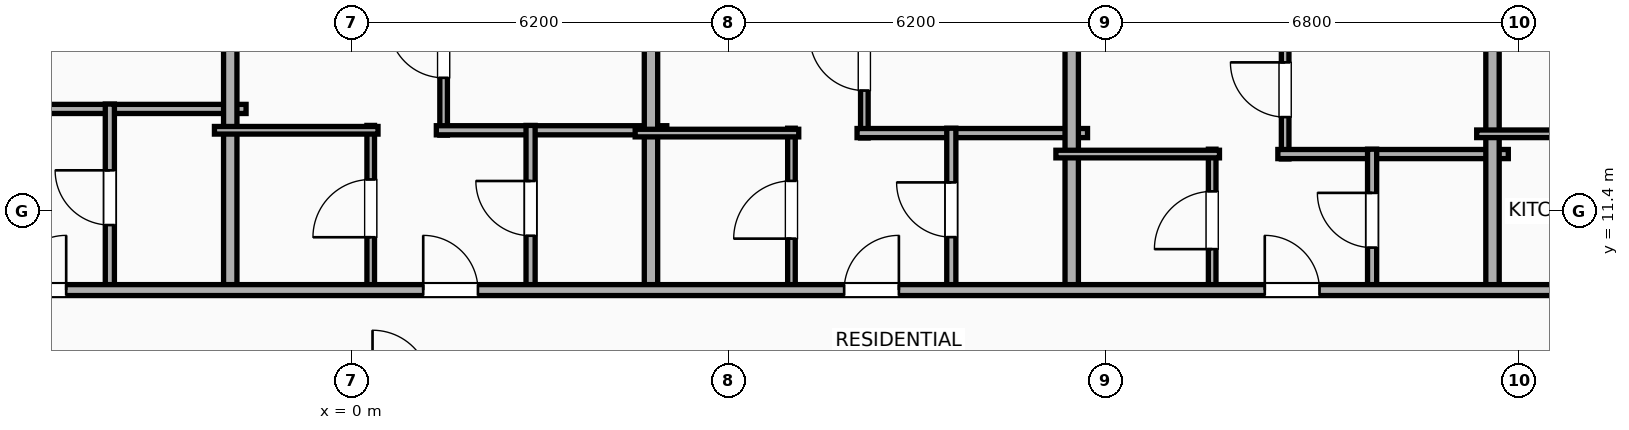
"""IFC4 building model, lengths in metres.
Left out: names, types, materials, properties, quantities, classifications, styles, units other than length and angle.
Written with IfcOpenShell. Run it as: python <this file> out.ifc"""

import sys

from ifc_helpers import new_model, si_unit, direction, frame, frame_2d, origin, place, context, subcontext, project, spatial, rectangle, extrude, element, fill, save


model = new_model("IFC4")
c1 = context("Model", 3, precision=1e-05, world=origin(), true_north=direction((0.0, 1.0)))
c2 = subcontext(c1, "Body", "Model", "MODEL_VIEW")
j1 = project(units=[si_unit("LENGTHUNIT", "METRE"), si_unit("PLANEANGLEUNIT", "RADIAN")], contexts=[c1])
p1 = place(None, origin())
s1 = spatial("IfcSite", under=j1, at=p1, CompositionType="ELEMENT")
p2 = place(p1, origin())
s2 = spatial("IfcBuilding", under=s1, at=p2, CompositionType="ELEMENT")
p3 = place(p2, frame((0.0, 0.0, 299.0)))
s3 = spatial("IfcBuildingStorey", under=s2, at=p3, CompositionType="ELEMENT", Elevation=299.0)
p4 = place(p3, frame((-5.53, 13.079, 0.0), z_axis=(0.0, 0.0, 1.0), x_axis=(1.0, 0.0, 0.0)))
e1 = element("IfcWall", 1, at=p4, inside=s3, PredefinedType="PLUMBINGWALL", context=c2, shape_type="SweptSolid", body=[
    extrude(rectangle(XDim=3.79, YDim=0.15, at=frame_2d((1.895, 0.0))), origin(), (0.0, 0.0, 1.0), 3.635),
])
p5 = place(p3, frame((-3.98, 10.08, 0.0), z_axis=(0.0, 0.0, 1.0), x_axis=(0.0, 1.0, 0.0)))
e2 = element("IfcWall", 2, at=p5, inside=s3, PredefinedType="PLUMBINGWALL", context=c2, shape_type="SweptSolid", body=[
    extrude(rectangle(XDim=3.079, YDim=0.15, at=frame_2d((1.54, 0.0))), origin(), (0.0, 0.0, 1.0), 3.635),
])
p6 = place(p5, frame((1.09, 0.0, 0.0)))
e3 = element("IfcOpeningElement", 3, at=p6, cuts=e2, PredefinedType="OPENING", context=c2, shape_type="SweptSolid", body=[
    extrude(rectangle(XDim=0.9, YDim=2.05, at=frame_2d((0.45, 1.025))), frame((0.0, 0.085, 0.0), z_axis=(0.0, -1.0, 0.0), x_axis=(1.0, 0.0, 0.0)), (0.0, 0.0, 1.0), 0.17),
])
p7 = place(p3, frame((-2.0, 10.02, 0.0), z_axis=(0.0, 0.0, 1.0), x_axis=(0.0, 1.0, 0.0)))
e4 = element("IfcWall", 4, at=p7, inside=s3, PredefinedType="PARTITIONING", context=c2, shape_type="SweptSolid", body=[
    extrude(rectangle(XDim=8.65, YDim=0.22, at=frame_2d((4.325, 0.0))), origin(), (0.0, 0.0, 1.0), 3.635),
])
p8 = place(p3, frame((1.509, 12.648, 0.0), z_axis=(0.0, 0.0, 1.0), x_axis=(0.0, 1.0, 0.0)))
e5 = element("IfcWall", 5, at=p8, inside=s3, PredefinedType="PARTITIONING", context=c2, shape_type="SweptSolid", body=[
    extrude(rectangle(XDim=5.804, YDim=0.125, at=frame_2d((2.902, 0.0))), origin(), (0.0, 0.0, 1.0), 3.635),
])
p9 = place(p8, frame((0.943, 0.0, 0.0)))
e6 = element("IfcOpeningElement", 6, at=p9, cuts=e5, PredefinedType="OPENING", context=c2, shape_type="SweptSolid", body=[
    extrude(rectangle(XDim=0.9, YDim=2.05, at=frame_2d((0.45, 1.025))), frame((0.0, 0.073, 0.0), z_axis=(0.0, -1.0, 0.0), x_axis=(1.0, 0.0, 0.0)), (0.0, 0.0, 1.0), 0.145),
])
p10 = place(p3, frame((1.389, 12.728, 0.0), z_axis=(0.0, 0.0, 1.0), x_axis=(1.0, 0.0, 0.0)))
e7 = element("IfcWall", 7, at=p10, inside=s3, PredefinedType="PLUMBINGWALL", context=c2, shape_type="SweptSolid", body=[
    extrude(rectangle(XDim=3.79, YDim=0.15, at=frame_2d((1.895, 0.0))), origin(), (0.0, 0.0, 1.0), 3.635),
])
p11 = place(p3, frame((0.31, 10.08, 0.0), z_axis=(0.0, 0.0, 1.0), x_axis=(0.0, 1.0, 0.0)))
e8 = element("IfcWall", 8, at=p11, inside=s3, PredefinedType="PARTITIONING", context=c2, shape_type="SweptSolid", body=[
    extrude(rectangle(XDim=2.728, YDim=0.125, at=frame_2d((1.364, 0.0))), origin(), (0.0, 0.0, 1.0), 3.635),
])
p12 = place(p11, frame((0.889, 0.0, 0.0)))
e9 = element("IfcOpeningElement", 9, at=p12, cuts=e8, PredefinedType="OPENING", context=c2, shape_type="SweptSolid", body=[
    extrude(rectangle(XDim=0.95, YDim=2.05, at=frame_2d((0.475, 1.025))), frame((0.0, 0.073, 0.0), z_axis=(0.0, -1.0, 0.0), x_axis=(1.0, 0.0, 0.0)), (0.0, 0.0, 1.0), 0.145),
])
p13 = place(p3, frame((-2.26, 12.728, 0.0), z_axis=(0.0, 0.0, 1.0), x_axis=(1.0, 0.0, 0.0)))
e10 = element("IfcWall", 10, at=p13, inside=s3, PredefinedType="PARTITIONING", context=c2, shape_type="SweptSolid", body=[
    extrude(rectangle(XDim=2.69, YDim=0.125, at=frame_2d((1.345, 0.0))), origin(), (0.0, 0.0, 1.0), 3.635),
])
p14 = place(p3, frame((2.939, 10.08, 0.0), z_axis=(0.0, 0.0, 1.0), x_axis=(0.0, 1.0, 0.0)))
e11 = element("IfcWall", 11, at=p14, inside=s3, PredefinedType="PLUMBINGWALL", context=c2, shape_type="SweptSolid", body=[
    extrude(rectangle(XDim=2.728, YDim=0.15, at=frame_2d((1.364, 0.0))), origin(), (0.0, 0.0, 1.0), 3.635),
])
p15 = place(p14, frame((0.914, 0.0, 0.0)))
e12 = element("IfcOpeningElement", 12, at=p15, cuts=e11, PredefinedType="OPENING", context=c2, shape_type="SweptSolid", body=[
    extrude(rectangle(XDim=0.9, YDim=2.05, at=frame_2d((0.45, 1.025))), frame((0.0, 0.085, 0.0), z_axis=(0.0, -1.0, 0.0), x_axis=(1.0, 0.0, 0.0)), (0.0, 0.0, 1.0), 0.17),
])
p16 = place(p3, frame((4.919, 10.02, 0.0), z_axis=(0.0, 0.0, 1.0), x_axis=(0.0, 1.0, 0.0)))
e13 = element("IfcWall", 13, at=p16, inside=s3, PredefinedType="PARTITIONING", context=c2, shape_type="SweptSolid", body=[
    extrude(rectangle(XDim=7.922, YDim=0.22, at=frame_2d((3.961, 0.0))), origin(), (0.0, 0.0, 1.0), 3.635),
])
p17 = place(p3, frame((8.428, 12.602, 0.0), z_axis=(0.0, 0.0, 1.0), x_axis=(0.0, 1.0, 0.0)))
e14 = element("IfcWall", 14, at=p17, inside=s3, PredefinedType="PARTITIONING", context=c2, shape_type="SweptSolid", body=[
    extrude(rectangle(XDim=5.122, YDim=0.125, at=frame_2d((2.561, 0.0))), origin(), (0.0, 0.0, 1.0), 3.635),
])
p18 = place(p17, frame((0.779, 0.0, 0.0)))
e15 = element("IfcOpeningElement", 15, at=p18, cuts=e14, PredefinedType="OPENING", context=c2, shape_type="SweptSolid", body=[
    extrude(rectangle(XDim=0.9, YDim=2.05, at=frame_2d((0.45, 1.025))), frame((0.0, 0.073, 0.0), z_axis=(0.0, -1.0, 0.0), x_axis=(1.0, 0.0, 0.0)), (0.0, 0.0, 1.0), 0.145),
])
p19 = place(p3, frame((8.308, 12.682, 0.0), z_axis=(0.0, 0.0, 1.0), x_axis=(1.0, 0.0, 0.0)))
e16 = element("IfcWall", 16, at=p19, inside=s3, PredefinedType="PLUMBINGWALL", context=c2, shape_type="SweptSolid", body=[
    extrude(rectangle(XDim=3.79, YDim=0.15, at=frame_2d((1.895, 0.0))), origin(), (0.0, 0.0, 1.0), 3.635),
])
p20 = place(p3, frame((7.229, 10.08, 0.0), z_axis=(0.0, 0.0, 1.0), x_axis=(0.0, 1.0, 0.0)))
e17 = element("IfcWall", 17, at=p20, inside=s3, PredefinedType="PARTITIONING", context=c2, shape_type="SweptSolid", body=[
    extrude(rectangle(XDim=2.682, YDim=0.125, at=frame_2d((1.341, 0.0))), origin(), (0.0, 0.0, 1.0), 3.635),
])
p21 = place(p20, frame((0.866, 0.0, 0.0)))
e18 = element("IfcOpeningElement", 18, at=p21, cuts=e17, PredefinedType="OPENING", context=c2, shape_type="SweptSolid", body=[
    extrude(rectangle(XDim=0.95, YDim=2.05, at=frame_2d((0.475, 1.025))), frame((0.0, 0.073, 0.0), z_axis=(0.0, -1.0, 0.0), x_axis=(1.0, 0.0, 0.0)), (0.0, 0.0, 1.0), 0.145),
])
p22 = place(p3, frame((4.659, 12.682, 0.0), z_axis=(0.0, 0.0, 1.0), x_axis=(1.0, 0.0, 0.0)))
e19 = element("IfcWall", 19, at=p22, inside=s3, PredefinedType="PARTITIONING", context=c2, shape_type="SweptSolid", body=[
    extrude(rectangle(XDim=2.69, YDim=0.125, at=frame_2d((1.345, 0.0))), origin(), (0.0, 0.0, 1.0), 3.635),
])
p23 = place(p3, frame((9.858, 10.08, 0.0), z_axis=(0.0, 0.0, 1.0), x_axis=(0.0, 1.0, 0.0)))
e20 = element("IfcWall", 20, at=p23, inside=s3, PredefinedType="PLUMBINGWALL", context=c2, shape_type="SweptSolid", body=[
    extrude(rectangle(XDim=2.682, YDim=0.15, at=frame_2d((1.341, 0.0))), origin(), (0.0, 0.0, 1.0), 3.635),
])
p24 = place(p23, frame((0.891, 0.0, 0.0)))
e21 = element("IfcOpeningElement", 21, at=p24, cuts=e20, PredefinedType="OPENING", context=c2, shape_type="SweptSolid", body=[
    extrude(rectangle(XDim=0.9, YDim=2.05, at=frame_2d((0.45, 1.025))), frame((0.0, 0.085, 0.0), z_axis=(0.0, -1.0, 0.0), x_axis=(1.0, 0.0, 0.0)), (0.0, 0.0, 1.0), 0.17),
])
p25 = place(p3, frame((11.838, 10.02, 0.0), z_axis=(0.0, 0.0, 1.0), x_axis=(0.0, 1.0, 0.0)))
e22 = element("IfcWall", 22, at=p25, inside=s3, PredefinedType="PARTITIONING", context=c2, shape_type="SweptSolid", body=[
    extrude(rectangle(XDim=7.195, YDim=0.22, at=frame_2d((3.598, 0.0))), origin(), (0.0, 0.0, 1.0), 3.635),
])
p26 = place(p3, frame((15.348, 12.257, 0.0), z_axis=(0.0, 0.0, 1.0), x_axis=(0.0, 1.0, 0.0)))
e23 = element("IfcWall", 23, at=p26, inside=s3, PredefinedType="PARTITIONING", context=c2, shape_type="SweptSolid", body=[
    extrude(rectangle(XDim=4.74, YDim=0.125, at=frame_2d((2.37, 0.0))), origin(), (0.0, 0.0, 1.0), 3.635),
])
p27 = place(p26, frame((0.688, 0.0, 0.0)))
e24 = element("IfcOpeningElement", 24, at=p27, cuts=e23, PredefinedType="OPENING", context=c2, shape_type="SweptSolid", body=[
    extrude(rectangle(XDim=0.9, YDim=2.05, at=frame_2d((0.45, 1.025))), frame((0.0, 0.073, 0.0), z_axis=(0.0, -1.0, 0.0), x_axis=(1.0, 0.0, 0.0)), (0.0, 0.0, 1.0), 0.145),
])
p28 = place(p3, frame((15.228, 12.337, 0.0), z_axis=(0.0, 0.0, 1.0), x_axis=(1.0, 0.0, 0.0)))
e25 = element("IfcWall", 25, at=p28, inside=s3, PredefinedType="PLUMBINGWALL", context=c2, shape_type="SweptSolid", body=[
    extrude(rectangle(XDim=3.79, YDim=0.15, at=frame_2d((1.895, 0.0))), origin(), (0.0, 0.0, 1.0), 3.635),
])
p29 = place(p3, frame((14.148, 10.08, 0.0), z_axis=(0.0, 0.0, 1.0), x_axis=(0.0, 1.0, 0.0)))
e26 = element("IfcWall", 26, at=p29, inside=s3, PredefinedType="PARTITIONING", context=c2, shape_type="SweptSolid", body=[
    extrude(rectangle(XDim=2.337, YDim=0.125, at=frame_2d((1.168, 0.0))), origin(), (0.0, 0.0, 1.0), 3.635),
])
p30 = place(p29, frame((0.694, 0.0, 0.0)))
e27 = element("IfcOpeningElement", 27, at=p30, cuts=e26, PredefinedType="OPENING", context=c2, shape_type="SweptSolid", body=[
    extrude(rectangle(XDim=0.95, YDim=2.05, at=frame_2d((0.475, 1.025))), frame((0.0, 0.073, 0.0), z_axis=(0.0, -1.0, 0.0), x_axis=(1.0, 0.0, 0.0)), (0.0, 0.0, 1.0), 0.145),
])
p31 = place(p3, frame((11.578, 12.337, 0.0), z_axis=(0.0, 0.0, 1.0), x_axis=(1.0, 0.0, 0.0)))
e28 = element("IfcWall", 28, at=p31, inside=s3, PredefinedType="PARTITIONING", context=c2, shape_type="SweptSolid", body=[
    extrude(rectangle(XDim=2.69, YDim=0.125, at=frame_2d((1.345, 0.0))), origin(), (0.0, 0.0, 1.0), 3.635),
])
p32 = place(p3, frame((16.778, 10.08, 0.0), z_axis=(0.0, 0.0, 1.0), x_axis=(0.0, 1.0, 0.0)))
e29 = element("IfcWall", 29, at=p32, inside=s3, PredefinedType="PLUMBINGWALL", context=c2, shape_type="SweptSolid", body=[
    extrude(rectangle(XDim=2.337, YDim=0.15, at=frame_2d((1.168, 0.0))), origin(), (0.0, 0.0, 1.0), 3.635),
])
p33 = place(p32, frame((0.719, 0.0, 0.0)))
e30 = element("IfcOpeningElement", 30, at=p33, cuts=e29, PredefinedType="OPENING", context=c2, shape_type="SweptSolid", body=[
    extrude(rectangle(XDim=0.9, YDim=2.05, at=frame_2d((0.45, 1.025))), frame((0.0, 0.085, 0.0), z_axis=(0.0, -1.0, 0.0), x_axis=(1.0, 0.0, 0.0)), (0.0, 0.0, 1.0), 0.17),
])
p34 = place(p3, frame((18.758, 10.02, 0.0), z_axis=(0.0, 0.0, 1.0), x_axis=(0.0, 1.0, 0.0)))
e31 = element("IfcWall", 31, at=p34, inside=s3, PredefinedType="PARTITIONING", context=c2, shape_type="SweptSolid", body=[
    extrude(rectangle(XDim=6.468, YDim=0.22, at=frame_2d((3.234, 0.0))), origin(), (0.0, 0.0, 1.0), 3.635),
])
p35 = place(p3, frame((18.498, 12.67, 0.0), z_axis=(0.0, 0.0, 1.0), x_axis=(1.0, 0.0, 0.0)))
e32 = element("IfcWall", 32, at=p35, inside=s3, PredefinedType="PARTITIONING", context=c2, shape_type="SweptSolid", body=[
    extrude(rectangle(XDim=2.986, YDim=0.125, at=frame_2d((1.493, 0.0))), origin(), (0.0, 0.0, 1.0), 3.635),
])
p36 = place(p3, frame((-28.516, 10.1, 0.0), z_axis=(0.0, 0.0, 1.0), x_axis=(1.0, 0.0, 0.0)))
e33 = element("IfcWall", 33, at=p36, inside=s3, PredefinedType="PARTITIONING", context=c2, shape_type="SweptSolid", body=[
    extrude(rectangle(XDim=53.955, YDim=0.18, at=frame_2d((26.978, 0.0))), origin(), (0.0, 0.0, 1.0), 3.635),
])
p37 = place(p36, frame((2.998, 0.0, 0.0)))
e34 = element("IfcOpeningElement", 34, at=p37, cuts=e33, PredefinedType="OPENING", context=c2, shape_type="SweptSolid", body=[
    extrude(rectangle(XDim=0.9, YDim=2.05, at=frame_2d((0.45, 1.025))), frame((0.0, 0.1, 0.0), z_axis=(0.0, -1.0, 0.0), x_axis=(1.0, 0.0, 0.0)), (0.0, 0.0, 1.0), 0.2),
])
p38 = place(p36, frame((9.656, 0.0, 0.0)))
e35 = element("IfcOpeningElement", 35, at=p38, cuts=e33, PredefinedType="OPENING", context=c2, shape_type="SweptSolid", body=[
    extrude(rectangle(XDim=0.9, YDim=2.05, at=frame_2d((0.45, 1.025))), frame((0.0, 0.1, 0.0), z_axis=(0.0, -1.0, 0.0), x_axis=(1.0, 0.0, 0.0)), (0.0, 0.0, 1.0), 0.2),
])
p39 = place(p36, frame((16.287, 0.0, 0.0)))
e36 = element("IfcOpeningElement", 36, at=p39, cuts=e33, PredefinedType="OPENING", context=c2, shape_type="SweptSolid", body=[
    extrude(rectangle(XDim=0.9, YDim=2.05, at=frame_2d((0.45, 1.025))), frame((0.0, 0.1, 0.0), z_axis=(0.0, -1.0, 0.0), x_axis=(1.0, 0.0, 0.0)), (0.0, 0.0, 1.0), 0.2),
])
p40 = place(p36, frame((22.918, 0.0, 0.0)))
e37 = element("IfcOpeningElement", 37, at=p40, cuts=e33, PredefinedType="OPENING", context=c2, shape_type="SweptSolid", body=[
    extrude(rectangle(XDim=0.9, YDim=2.05, at=frame_2d((0.45, 1.025))), frame((0.0, 0.1, 0.0), z_axis=(0.0, -1.0, 0.0), x_axis=(1.0, 0.0, 0.0)), (0.0, 0.0, 1.0), 0.2),
])
p41 = place(p36, frame((29.689, 0.0, 0.0)))
e38 = element("IfcOpeningElement", 38, at=p41, cuts=e33, PredefinedType="OPENING", context=c2, shape_type="SweptSolid", body=[
    extrude(rectangle(XDim=0.9, YDim=2.05, at=frame_2d((0.45, 1.025))), frame((0.0, 0.1, 0.0), z_axis=(0.0, -1.0, 0.0), x_axis=(1.0, 0.0, 0.0)), (0.0, 0.0, 1.0), 0.2),
])
p42 = place(p36, frame((36.612, 0.0, 0.0)))
e39 = element("IfcOpeningElement", 39, at=p42, cuts=e33, PredefinedType="OPENING", context=c2, shape_type="SweptSolid", body=[
    extrude(rectangle(XDim=0.9, YDim=2.05, at=frame_2d((0.45, 1.025))), frame((0.0, 0.1, 0.0), z_axis=(0.0, -1.0, 0.0), x_axis=(1.0, 0.0, 0.0)), (0.0, 0.0, 1.0), 0.2),
])
p43 = place(p36, frame((43.529, 0.0, 0.0)))
e40 = element("IfcOpeningElement", 40, at=p43, cuts=e33, PredefinedType="OPENING", context=c2, shape_type="SweptSolid", body=[
    extrude(rectangle(XDim=0.9, YDim=2.05, at=frame_2d((0.45, 1.025))), frame((0.0, 0.1, 0.0), z_axis=(0.0, -1.0, 0.0), x_axis=(1.0, 0.0, 0.0)), (0.0, 0.0, 1.0), 0.2),
])
p44 = place(p36, frame((50.452, 0.0, 0.0)))
e41 = element("IfcOpeningElement", 41, at=p44, cuts=e33, PredefinedType="OPENING", context=c2, shape_type="SweptSolid", body=[
    extrude(rectangle(XDim=0.9, YDim=2.05, at=frame_2d((0.45, 1.025))), frame((0.0, 0.1, 0.0), z_axis=(0.0, -1.0, 0.0), x_axis=(1.0, 0.0, 0.0)), (0.0, 0.0, 1.0), 0.2),
])
p45 = place(p6, origin())
e42 = element("IfcDoor", 42, at=p45, inside=s3, OperationType="SINGLE_SWING_RIGHT", PredefinedType="DOOR", context=c2, shape_type="SweptSolid", body=[
    extrude(rectangle(XDim=0.9, YDim=2.05, at=frame_2d((0.45, 1.025))), frame((0.0, 0.025, 0.0), z_axis=(0.0, -1.0, 0.0), x_axis=(1.0, 0.0, 0.0)), (0.0, 0.0, 1.0), 0.05),
])
fill(e3, e42)
p46 = place(p9, origin())
e43 = element("IfcDoor", 43, at=p46, inside=s3, OperationType="SINGLE_SWING_RIGHT", PredefinedType="DOOR", context=c2, shape_type="SweptSolid", body=[
    extrude(rectangle(XDim=0.9, YDim=2.05, at=frame_2d((0.45, 1.025))), frame((0.0, 0.025, 0.0), z_axis=(0.0, -1.0, 0.0), x_axis=(1.0, 0.0, 0.0)), (0.0, 0.0, 1.0), 0.05),
])
fill(e6, e43)
p47 = place(p12, origin())
e44 = element("IfcDoor", 44, at=p47, inside=s3, OperationType="SINGLE_SWING_LEFT", PredefinedType="DOOR", context=c2, shape_type="SweptSolid", body=[
    extrude(rectangle(XDim=0.95, YDim=2.05, at=frame_2d((0.475, 1.025))), frame((0.0, 0.025, 0.0), z_axis=(0.0, -1.0, 0.0), x_axis=(1.0, 0.0, 0.0)), (0.0, 0.0, 1.0), 0.05),
])
fill(e9, e44)
p48 = place(p15, origin())
e45 = element("IfcDoor", 45, at=p48, inside=s3, OperationType="SINGLE_SWING_RIGHT", PredefinedType="DOOR", context=c2, shape_type="SweptSolid", body=[
    extrude(rectangle(XDim=0.9, YDim=2.05, at=frame_2d((0.45, 1.025))), frame((0.0, 0.025, 0.0), z_axis=(0.0, -1.0, 0.0), x_axis=(1.0, 0.0, 0.0)), (0.0, 0.0, 1.0), 0.05),
])
fill(e12, e45)
p49 = place(p18, origin())
e46 = element("IfcDoor", 46, at=p49, inside=s3, OperationType="SINGLE_SWING_RIGHT", PredefinedType="DOOR", context=c2, shape_type="SweptSolid", body=[
    extrude(rectangle(XDim=0.9, YDim=2.05, at=frame_2d((0.45, 1.025))), frame((0.0, 0.025, 0.0), z_axis=(0.0, -1.0, 0.0), x_axis=(1.0, 0.0, 0.0)), (0.0, 0.0, 1.0), 0.05),
])
fill(e15, e46)
p50 = place(p21, origin())
e47 = element("IfcDoor", 47, at=p50, inside=s3, OperationType="SINGLE_SWING_LEFT", PredefinedType="DOOR", context=c2, shape_type="SweptSolid", body=[
    extrude(rectangle(XDim=0.95, YDim=2.05, at=frame_2d((0.475, 1.025))), frame((0.0, 0.025, 0.0), z_axis=(0.0, -1.0, 0.0), x_axis=(1.0, 0.0, 0.0)), (0.0, 0.0, 1.0), 0.05),
])
fill(e18, e47)
p51 = place(p24, origin())
e48 = element("IfcDoor", 48, at=p51, inside=s3, OperationType="SINGLE_SWING_RIGHT", PredefinedType="DOOR", context=c2, shape_type="SweptSolid", body=[
    extrude(rectangle(XDim=0.9, YDim=2.05, at=frame_2d((0.45, 1.025))), frame((0.0, 0.025, 0.0), z_axis=(0.0, -1.0, 0.0), x_axis=(1.0, 0.0, 0.0)), (0.0, 0.0, 1.0), 0.05),
])
fill(e21, e48)
p52 = place(p27, origin())
e49 = element("IfcDoor", 49, at=p52, inside=s3, OperationType="SINGLE_SWING_RIGHT", PredefinedType="DOOR", context=c2, shape_type="SweptSolid", body=[
    extrude(rectangle(XDim=0.9, YDim=2.05, at=frame_2d((0.45, 1.025))), frame((0.0, 0.025, 0.0), z_axis=(0.0, -1.0, 0.0), x_axis=(1.0, 0.0, 0.0)), (0.0, 0.0, 1.0), 0.05),
])
fill(e24, e49)
p53 = place(p30, origin())
e50 = element("IfcDoor", 50, at=p53, inside=s3, OperationType="SINGLE_SWING_LEFT", PredefinedType="DOOR", context=c2, shape_type="SweptSolid", body=[
    extrude(rectangle(XDim=0.95, YDim=2.05, at=frame_2d((0.475, 1.025))), frame((0.0, 0.025, 0.0), z_axis=(0.0, -1.0, 0.0), x_axis=(1.0, 0.0, 0.0)), (0.0, 0.0, 1.0), 0.05),
])
fill(e27, e50)
p54 = place(p33, origin())
e51 = element("IfcDoor", 51, at=p54, inside=s3, OperationType="SINGLE_SWING_RIGHT", PredefinedType="DOOR", context=c2, shape_type="SweptSolid", body=[
    extrude(rectangle(XDim=0.9, YDim=2.05, at=frame_2d((0.45, 1.025))), frame((0.0, 0.025, 0.0), z_axis=(0.0, -1.0, 0.0), x_axis=(1.0, 0.0, 0.0)), (0.0, 0.0, 1.0), 0.05),
])
fill(e30, e51)
p55 = place(p40, origin())
e52 = element("IfcDoor", 52, at=p55, inside=s3, OperationType="SINGLE_SWING_RIGHT", PredefinedType="DOOR", context=c2, shape_type="SweptSolid", body=[
    extrude(rectangle(XDim=0.9, YDim=2.05, at=frame_2d((0.45, 1.025))), frame((0.0, 0.025, 0.0), z_axis=(0.0, -1.0, 0.0), x_axis=(1.0, 0.0, 0.0)), (0.0, 0.0, 1.0), 0.05),
])
fill(e37, e52)
p56 = place(p41, origin())
e53 = element("IfcDoor", 53, at=p56, inside=s3, OperationType="SINGLE_SWING_LEFT", PredefinedType="DOOR", context=c2, shape_type="SweptSolid", body=[
    extrude(rectangle(XDim=0.9, YDim=2.05, at=frame_2d((0.45, 1.025))), frame((0.0, 0.025, 0.0), z_axis=(0.0, -1.0, 0.0), x_axis=(1.0, 0.0, 0.0)), (0.0, 0.0, 1.0), 0.05),
])
fill(e38, e53)
p57 = place(p42, origin())
e54 = element("IfcDoor", 54, at=p57, inside=s3, OperationType="SINGLE_SWING_RIGHT", PredefinedType="DOOR", context=c2, shape_type="SweptSolid", body=[
    extrude(rectangle(XDim=0.9, YDim=2.05, at=frame_2d((0.45, 1.025))), frame((0.0, 0.025, 0.0), z_axis=(0.0, -1.0, 0.0), x_axis=(1.0, 0.0, 0.0)), (0.0, 0.0, 1.0), 0.05),
])
fill(e39, e54)
p58 = place(p43, origin())
e55 = element("IfcDoor", 55, at=p58, inside=s3, OperationType="SINGLE_SWING_LEFT", PredefinedType="DOOR", context=c2, shape_type="SweptSolid", body=[
    extrude(rectangle(XDim=0.9, YDim=2.05, at=frame_2d((0.45, 1.025))), frame((0.0, 0.025, 0.0), z_axis=(0.0, -1.0, 0.0), x_axis=(1.0, 0.0, 0.0)), (0.0, 0.0, 1.0), 0.05),
])
fill(e40, e55)
save(model, sys.argv[1])
